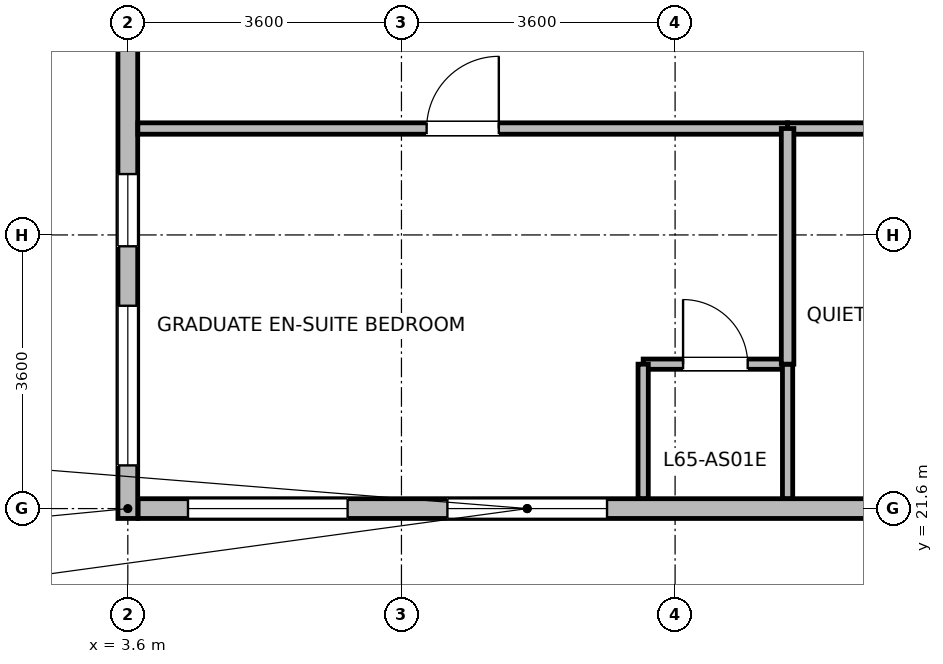
"""IFC4 building model, lengths in metres.
Left out: names, types, materials, properties, quantities, classifications, styles, units other than length and angle.
Written with IfcOpenShell. Run it as: python <this file> out.ifc"""

import sys

from ifc_helpers import new_model, si_unit, direction, frame, frame_2d, origin, place, context, subcontext, project, spatial, rectangle, extrude, element, fill, save


model = new_model("IFC4")
c1 = context("Model", 3, precision=1e-05, world=origin(), true_north=direction((0.0, 1.0)))
c2 = subcontext(c1, "Body", "Model", "MODEL_VIEW")
j1 = project(units=[si_unit("LENGTHUNIT", "METRE"), si_unit("PLANEANGLEUNIT", "RADIAN")], contexts=[c1])
p1 = place(None, origin())
s1 = spatial("IfcSite", under=j1, at=p1, CompositionType="ELEMENT")
p2 = place(p1, origin())
s2 = spatial("IfcBuilding", under=s1, at=p2, CompositionType="ELEMENT")
p3 = place(p2, frame((0.0, 0.0, 253.6)))
s3 = spatial("IfcBuildingStorey", under=s2, at=p3, CompositionType="ELEMENT", Elevation=253.6)
p4 = place(p3, frame((13.974, 21.6, 0.0), z_axis=(0.0, 0.0, 1.0), x_axis=(-1.0, 0.0, 0.0)))
e1 = element("IfcWall", 1, at=p4, inside=s3, PredefinedType="STANDARD", context=c2, shape_type="SweptSolid", body=[
    extrude(rectangle(XDim=10.239, YDim=0.26, at=frame_2d((5.12, 0.0))), origin(), (0.0, 0.0, 1.0), 3.455),
])
p5 = place(p4, frame((4.07, 0.0, 0.85)))
e2 = element("IfcOpeningElement", 2, at=p5, cuts=e1, PredefinedType="OPENING", context=c2, shape_type="SweptSolid", body=[
    extrude(rectangle(XDim=2.1, YDim=1.95, at=frame_2d((1.05, 0.975))), frame((0.0, 0.14, 0.0), z_axis=(0.0, -1.0, 0.0), x_axis=(1.0, 0.0, 0.0)), (0.0, 0.0, 1.0), 0.28),
])
p6 = place(p4, frame((7.482, 0.0, 0.85)))
e3 = element("IfcOpeningElement", 3, at=p6, cuts=e1, PredefinedType="OPENING", context=c2, shape_type="SweptSolid", body=[
    extrude(rectangle(XDim=2.1, YDim=1.95, at=frame_2d((1.05, 0.975))), frame((0.0, 0.14, 0.0), z_axis=(0.0, -1.0, 0.0), x_axis=(1.0, 0.0, 0.0)), (0.0, 0.0, 1.0), 0.28),
])
p7 = place(p3, frame((3.6, 21.47, 0.0), z_axis=(0.0, 0.0, 1.0), x_axis=(0.0, 1.0, 0.0)))
e4 = element("IfcWall", 4, at=p7, inside=s3, PredefinedType="STANDARD", context=c2, shape_type="SweptSolid", body=[
    extrude(rectangle(XDim=6.993, YDim=0.26, at=frame_2d((3.497, 0.0))), origin(), (0.0, 0.0, 1.0), 3.455),
])
p8 = place(p7, frame((0.698, 0.0, 0.85)))
e5 = element("IfcOpeningElement", 5, at=p8, cuts=e4, PredefinedType="OPENING", context=c2, shape_type="SweptSolid", body=[
    extrude(rectangle(XDim=2.1, YDim=1.95, at=frame_2d((1.05, 0.975))), frame((0.0, 0.14, 0.0), z_axis=(0.0, -1.0, 0.0), x_axis=(1.0, 0.0, 0.0)), (0.0, 0.0, 1.0), 0.28),
])
p9 = place(p7, frame((3.581, 0.0, 0.85)))
e6 = element("IfcOpeningElement", 6, at=p9, cuts=e4, PredefinedType="OPENING", context=c2, shape_type="SweptSolid", body=[
    extrude(rectangle(XDim=0.95, YDim=1.75, at=frame_2d((0.475, 0.875))), frame((0.0, 0.14, 0.0), z_axis=(0.0, -1.0, 0.0), x_axis=(1.0, 0.0, 0.0)), (0.0, 0.0, 1.0), 0.28),
])
p10 = place(p3, frame((10.38, 23.5, 0.0), z_axis=(0.0, 0.0, 1.0), x_axis=(1.0, 0.0, 0.0)))
e7 = element("IfcWall", 7, at=p10, inside=s3, PredefinedType="PARTITIONING", context=c2, shape_type="SweptSolid", body=[
    extrude(rectangle(XDim=1.9, YDim=0.135, at=frame_2d((0.95, 0.0))), origin(), (0.0, 0.0, 1.0), 3.455),
])
p11 = place(p10, frame((0.525, 0.0, 0.0)))
e8 = element("IfcOpeningElement", 8, at=p11, cuts=e7, PredefinedType="OPENING", context=c2, shape_type="SweptSolid", body=[
    extrude(rectangle(XDim=0.85, YDim=2.04, at=frame_2d((0.425, 1.02))), frame((0.0, 0.078, 0.0), z_axis=(0.0, -1.0, 0.0), x_axis=(1.0, 0.0, 0.0)), (0.0, 0.0, 1.0), 0.155),
])
for number, where, z_axis, x_axis in (
    (9, (10.38, 21.732, 0.0), (0.0, 0.0, 1.0), (0.0, 1.0, 0.0)),
    (10, (12.28, 21.732, 0.0), (0.0, 0.0, 1.0), (0.0, 1.0, 0.0)),
):
    element("IfcWall", number, at=place(p3, frame(where, z_axis=z_axis, x_axis=x_axis)), inside=s3, PredefinedType="PARTITIONING", context=c2, shape_type="SweptSolid", body=[
        extrude(rectangle(XDim=1.768, YDim=0.135, at=frame_2d((0.884, 0.0))), origin(), (0.0, 0.0, 1.0), 3.455),
    ])
p12 = place(p3, frame((12.28, 26.6, 0.0), z_axis=(0.0, 0.0, 1.0), x_axis=(1.0, 0.0, 0.0)))
e11 = element("IfcWall", 11, at=p12, inside=s3, PredefinedType="PARTITIONING", context=c2, shape_type="SweptSolid", body=[
    extrude(rectangle(XDim=10.38, YDim=0.15, at=frame_2d((5.19, 0.0))), origin(), (0.0, 0.0, 1.0), 3.455),
])
p13 = place(p12, frame((4.54, 0.0, 0.0)))
e12 = element("IfcOpeningElement", 12, at=p13, cuts=e11, PredefinedType="OPENING", context=c2, shape_type="SweptSolid", body=[
    extrude(rectangle(XDim=1.3, YDim=2.12, at=frame_2d((0.65, 1.06))), frame((0.0, 0.085, 0.0), z_axis=(0.0, -1.0, 0.0), x_axis=(1.0, 0.0, 0.0)), (0.0, 0.0, 1.0), 0.17),
])
p14 = place(p3, frame((3.732, 26.6, 0.0), z_axis=(0.0, 0.0, 1.0), x_axis=(1.0, 0.0, 0.0)))
e13 = element("IfcWall", 13, at=p14, inside=s3, PredefinedType="PARTITIONING", context=c2, shape_type="SweptSolid", body=[
    extrude(rectangle(XDim=8.548, YDim=0.15, at=frame_2d((4.274, 0.0))), origin(), (0.0, 0.0, 1.0), 3.455),
])
p15 = place(p14, frame((3.799, 0.0, 0.0)))
e14 = element("IfcOpeningElement", 14, at=p15, cuts=e13, PredefinedType="OPENING", context=c2, shape_type="SweptSolid", body=[
    extrude(rectangle(XDim=0.95, YDim=2.1, at=frame_2d((0.475, 1.05))), frame((0.0, 0.085, 0.0), z_axis=(0.0, -1.0, 0.0), x_axis=(1.0, 0.0, 0.0)), (0.0, 0.0, 1.0), 0.17),
])
p16 = place(p3, frame((12.28, 23.5, 0.0), z_axis=(0.0, 0.0, 1.0), x_axis=(0.0, 1.0, 0.0)))
e15 = element("IfcWall", 15, at=p16, inside=s3, PredefinedType="PARTITIONING", context=c2, shape_type="SweptSolid", body=[
    extrude(rectangle(XDim=3.1, YDim=0.165, at=frame_2d((1.55, 0.0))), origin(), (0.0, 0.0, 1.0), 3.455),
])
p17 = place(p5, origin())
e16 = element("IfcWindow", 16, at=p17, inside=s3, PartitioningType="SINGLE_PANEL", PredefinedType="WINDOW", context=c2, shape_type="SweptSolid", body=[
    extrude(rectangle(XDim=2.1, YDim=1.95, at=frame_2d((1.05, 0.975))), frame((0.0, 0.03, 0.0), z_axis=(0.0, -1.0, 0.0), x_axis=(1.0, 0.0, 0.0)), (0.0, 0.0, 1.0), 0.06),
])
fill(e2, e16)
p18 = place(p6, origin())
e17 = element("IfcWindow", 17, at=p18, inside=s3, PartitioningType="SINGLE_PANEL", PredefinedType="WINDOW", context=c2, shape_type="SweptSolid", body=[
    extrude(rectangle(XDim=2.1, YDim=1.95, at=frame_2d((1.05, 0.975))), frame((0.0, 0.03, 0.0), z_axis=(0.0, -1.0, 0.0), x_axis=(1.0, 0.0, 0.0)), (0.0, 0.0, 1.0), 0.06),
])
fill(e3, e17)
p19 = place(p8, origin())
e18 = element("IfcWindow", 18, at=p19, inside=s3, PartitioningType="SINGLE_PANEL", PredefinedType="WINDOW", context=c2, shape_type="SweptSolid", body=[
    extrude(rectangle(XDim=2.1, YDim=1.95, at=frame_2d((1.05, 0.975))), frame((0.0, 0.03, 0.0), z_axis=(0.0, -1.0, 0.0), x_axis=(1.0, 0.0, 0.0)), (0.0, 0.0, 1.0), 0.06),
])
fill(e5, e18)
p20 = place(p9, origin())
e19 = element("IfcWindow", 19, at=p20, inside=s3, PartitioningType="SINGLE_PANEL", PredefinedType="WINDOW", context=c2, shape_type="SweptSolid", body=[
    extrude(rectangle(XDim=0.95, YDim=1.75, at=frame_2d((0.475, 0.875))), frame((0.0, 0.03, 0.0), z_axis=(0.0, -1.0, 0.0), x_axis=(1.0, 0.0, 0.0)), (0.0, 0.0, 1.0), 0.06),
])
fill(e6, e19)
p21 = place(p11, origin())
e20 = element("IfcDoor", 20, at=p21, inside=s3, OperationType="SINGLE_SWING_LEFT", PredefinedType="DOOR", context=c2, shape_type="SweptSolid", body=[
    extrude(rectangle(XDim=0.85, YDim=2.04, at=frame_2d((0.425, 1.02))), frame((0.0, 0.025, 0.0), z_axis=(0.0, -1.0, 0.0), x_axis=(1.0, 0.0, 0.0)), (0.0, 0.0, 1.0), 0.05),
])
fill(e8, e20)
p22 = place(p15, origin())
e21 = element("IfcDoor", 21, at=p22, inside=s3, OperationType="SINGLE_SWING_RIGHT", PredefinedType="DOOR", context=c2, shape_type="SweptSolid", body=[
    extrude(rectangle(XDim=0.95, YDim=2.1, at=frame_2d((0.475, 1.05))), frame((0.0, 0.025, 0.0), z_axis=(0.0, -1.0, 0.0), x_axis=(1.0, 0.0, 0.0)), (0.0, 0.0, 1.0), 0.05),
])
fill(e14, e21)
save(model, sys.argv[1])
